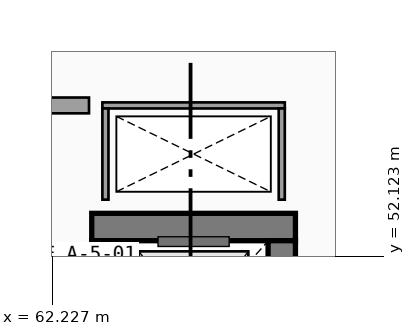
"""IFC4 building model, lengths in metres.
Left out: names, types, materials, properties, quantities, classifications, styles, units other than length and angle.
Written with IfcOpenShell. Run it as: python <this file> out.ifc"""

import sys

from ifc_helpers import new_model, si_unit, direction, frame, frame_2d, origin, place, context, subcontext, project, spatial, rectangle, extrude, element, save


model = new_model("IFC4")
c1 = context("Model", 3, precision=1e-05, world=origin(), true_north=direction((0.0, 1.0)))
c2 = subcontext(c1, "Body", "Model", "MODEL_VIEW")
j1 = project(units=[si_unit("LENGTHUNIT", "METRE"), si_unit("PLANEANGLEUNIT", "RADIAN")], contexts=[c1])
p1 = place(None, origin())
s1 = spatial("IfcSite", under=j1, at=p1, CompositionType="ELEMENT")
p2 = place(p1, origin())
s2 = spatial("IfcBuilding", under=s1, at=p2, CompositionType="ELEMENT")
p3 = place(p2, frame((0.0, 0.0, 14.1)))
s3 = spatial("IfcBuildingStorey", under=s2, at=p3, CompositionType="ELEMENT", Elevation=14.1)
p4 = place(p3, frame((66.225, 52.6, 0.0), z_axis=(0.0, 0.0, 1.0), x_axis=(-1.0, 0.0, 0.0)))
e1 = element("IfcWall", 1, at=p4, inside=s3, PredefinedType="SHEAR", context=c2, shape_type="SweptSolid", body=[
    extrude(rectangle(XDim=3.35, YDim=0.45, at=frame_2d((1.675, 0.0))), origin(), (0.0, 0.0, 1.0), 4.24),
])
p5 = place(p3, frame((63.1, 52.375, 0.0), z_axis=(0.0, 0.0, 1.0), x_axis=(0.0, -1.0, 0.0)))
e2 = element("IfcWall", 2, at=p5, inside=s3, PredefinedType="SHEAR", context=c2, shape_type="SweptSolid", body=[
    extrude(rectangle(XDim=2.75, YDim=0.45, at=frame_2d((1.375, 0.0))), origin(), (0.0, 0.0, 1.0), 4.24),
])
p6 = place(p5, frame((0.725, 0.0, 0.0), z_axis=(0.0, 0.0, 1.0), x_axis=(1.0, 0.0, 0.0)))
e3 = element("IfcOpeningElement", 3, at=p6, cuts=e2, PredefinedType="OPENING", context=c2, shape_type="SweptSolid", body=[
    extrude(rectangle(XDim=1.3, YDim=2.25, at=frame_2d((0.65, 1.125))), frame((0.0, 0.235, 0.0), z_axis=(0.0, -1.0, 0.0), x_axis=(1.0, 0.0, 0.0)), (0.0, 0.0, 1.0), 0.47),
])
p7 = place(p3, frame((66.0, 49.625, 0.0), z_axis=(0.0, 0.0, 1.0), x_axis=(0.0, 1.0, 0.0)))
e4 = element("IfcWall", 4, at=p7, inside=s3, PredefinedType="SHEAR", context=c2, shape_type="SweptSolid", body=[
    extrude(rectangle(XDim=2.75, YDim=0.45, at=frame_2d((1.375, 0.0))), origin(), (0.0, 0.0, 1.0), 4.24),
])
p8 = place(p3, frame((66.05, 54.6, 0.0), z_axis=(0.0, 0.0, 1.0), x_axis=(-1.0, 0.0, 0.0)))
e5 = element("IfcWall", 5, at=p8, inside=s3, PredefinedType="PARTITIONING", context=c2, shape_type="SweptSolid", body=[
    extrude(rectangle(XDim=3.0, YDim=0.1, at=frame_2d((1.5, 0.0))), origin(), (0.0, 0.0, 1.0), 4.24),
])
for number, where, z_axis, x_axis in (
    (6, (63.1, 54.55, 0.0), (0.0, 0.0, 1.0), (0.0, -1.0, 0.0)),
    (7, (66.0, 53.05, 0.0), (0.0, 0.0, 1.0), (0.0, 1.0, 0.0)),
):
    element("IfcWall", number, at=place(p3, frame(where, z_axis=z_axis, x_axis=x_axis)), inside=s3, PredefinedType="PARTITIONING", context=c2, shape_type="SweptSolid", body=[
        extrude(rectangle(XDim=1.5, YDim=0.1, at=frame_2d((0.75, 0.0))), origin(), (0.0, 0.0, 1.0), 4.24),
    ])
p9 = place(p3, frame((62.83, 54.6, 0.0), z_axis=(0.0, 0.0, 1.0), x_axis=(-1.0, 0.0, 0.0)))
e8 = element("IfcWall", 8, at=p9, inside=s3, PredefinedType="SOLIDWALL", context=c2, shape_type="SweptSolid", body=[
    extrude(rectangle(XDim=3.76, YDim=0.26, at=frame_2d((1.88, 0.0))), origin(), (0.0, 0.0, 1.0), 4.24),
])
save(model, sys.argv[1])
